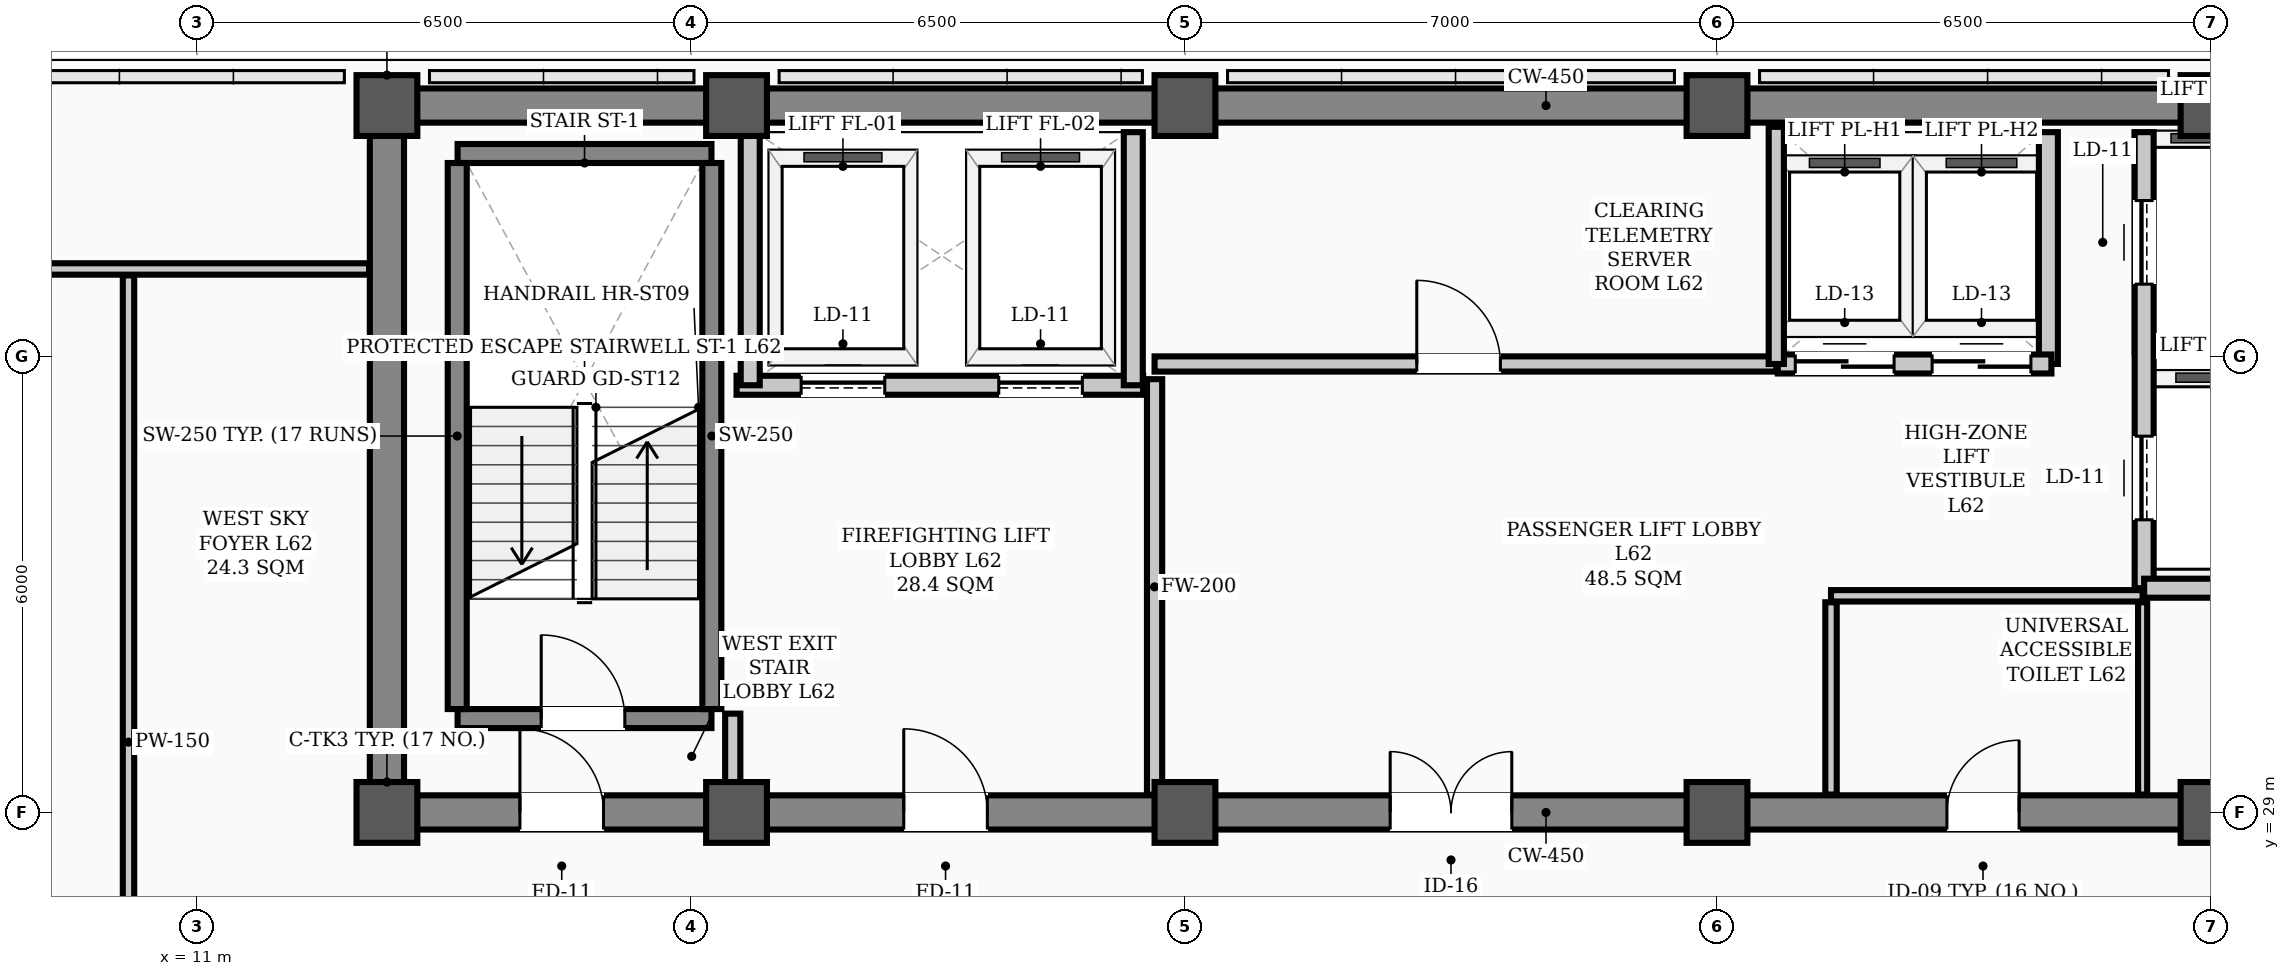
"""IFC4 building model, lengths in metres.
Left out: names, types, materials, properties, quantities, classifications, styles, units other than length and angle.
Written with IfcOpenShell. Run it as: python <this file> out.ifc"""

import sys

from ifc_helpers import new_model, si_unit, direction, frame, frame_2d, origin, origin_2d, place, context, subcontext, project, spatial, rectangle, hollow_rectangle, extrude, element, fill, save


model = new_model("IFC4")
c1 = context("Model", 3, precision=1e-05, world=origin(), true_north=direction((0.0, 1.0)))
c2 = subcontext(c1, "Body", "Model", "MODEL_VIEW")
j1 = project(units=[si_unit("LENGTHUNIT", "METRE"), si_unit("PLANEANGLEUNIT", "RADIAN")], contexts=[c1])
p1 = place(None, origin())
s1 = spatial("IfcSite", under=j1, at=p1, CompositionType="ELEMENT")
p2 = place(p1, origin())
s2 = spatial("IfcBuilding", under=s1, at=p2, CompositionType="ELEMENT")
p3 = place(p2, frame((0.0, 0.0, 250.1)))
s3 = spatial("IfcBuildingStorey", under=s2, at=p3, CompositionType="ELEMENT", Elevation=250.1)
for number, where, z_axis, x_axis in (
    (1, (13.5, 29.0, 0.0), (0.0, 0.0, 1.0), (1.0, 0.0, 0.0)),
    (2, (13.5, 38.3, 0.0), (0.0, 0.0, 1.0), (1.0, 0.0, 0.0)),
    (3, (18.1, 29.0, 0.0), (0.0, 0.0, 1.0), (1.0, 0.0, 0.0)),
    (4, (18.1, 38.3, 0.0), (0.0, 0.0, 1.0), (1.0, 0.0, 0.0)),
    (5, (24.0, 29.0, 0.0), (0.0, 0.0, 1.0), (1.0, 0.0, 0.0)),
    (6, (24.0, 38.3, 0.0), (0.0, 0.0, 1.0), (1.0, 0.0, 0.0)),
    (7, (31.0, 29.0, 0.0), (0.0, 0.0, 1.0), (1.0, 0.0, 0.0)),
    (8, (31.0, 38.3, 0.0), (0.0, 0.0, 1.0), (1.0, 0.0, 0.0)),
    (9, (37.5, 29.0, 0.0), (0.0, 0.0, 1.0), (1.0, 0.0, 0.0)),
    (10, (37.5, 38.3, 0.0), (0.0, 0.0, 1.0), (1.0, 0.0, 0.0)),
):
    element("IfcColumn", number, at=place(p3, frame(where, z_axis=z_axis, x_axis=x_axis)), inside=s3, PredefinedType="COLUMN", context=c2, shape_type="SweptSolid", body=[
        extrude(hollow_rectangle(XDim=0.8, YDim=0.8, WallThickness=0.032, InnerFilletRadius=0.016, OuterFilletRadius=0.048, at=origin_2d()), origin(), (0.0, 0.0, 1.0), 3.9),
    ])
p4 = place(p3, frame((13.5, 29.0, 0.0), z_axis=(0.0, 0.0, 1.0), x_axis=(1.0, 0.0, 0.0)))
e11 = element("IfcWall", 11, at=p4, inside=s3, PredefinedType="SHEAR", context=c2, shape_type="SweptSolid", body=[
    extrude(rectangle(XDim=30.5, YDim=0.45, at=frame_2d((15.25, 0.0))), origin(), (0.0, 0.0, 1.0), 3.72),
])
p5 = place(p4, frame((1.75, 0.0, 0.0)))
e12 = element("IfcOpeningElement", 12, at=p5, cuts=e11, PredefinedType="OPENING", context=c2, shape_type="SweptSolid", body=[
    extrude(rectangle(XDim=1.1, YDim=2.08, at=frame_2d((0.55, 1.04))), frame((0.0, 0.235, 0.0), z_axis=(0.0, -1.0, 0.0), x_axis=(1.0, 0.0, 0.0)), (0.0, 0.0, 1.0), 0.47),
])
p6 = place(p4, frame((26.7, 0.0, 0.0)))
e13 = element("IfcOpeningElement", 13, at=p6, cuts=e11, PredefinedType="OPENING", context=c2, shape_type="SweptSolid", body=[
    extrude(rectangle(XDim=1.1, YDim=2.08, at=frame_2d((0.55, 1.04))), frame((0.0, 0.235, 0.0), z_axis=(0.0, -1.0, 0.0), x_axis=(1.0, 0.0, 0.0)), (0.0, 0.0, 1.0), 0.47),
])
p7 = place(p4, frame((6.8, 0.0, 0.0)))
e14 = element("IfcOpeningElement", 14, at=p7, cuts=e11, PredefinedType="OPENING", context=c2, shape_type="SweptSolid", body=[
    extrude(rectangle(XDim=1.1, YDim=2.08, at=frame_2d((0.55, 1.04))), frame((0.0, 0.235, 0.0), z_axis=(0.0, -1.0, 0.0), x_axis=(1.0, 0.0, 0.0)), (0.0, 0.0, 1.0), 0.47),
])
p8 = place(p4, frame((13.2, 0.0, 0.0)))
e15 = element("IfcOpeningElement", 15, at=p8, cuts=e11, PredefinedType="OPENING", context=c2, shape_type="SweptSolid", body=[
    extrude(rectangle(XDim=1.6, YDim=2.08, at=frame_2d((0.8, 1.04))), frame((0.0, 0.235, 0.0), z_axis=(0.0, -1.0, 0.0), x_axis=(1.0, 0.0, 0.0)), (0.0, 0.0, 1.0), 0.47),
])
p9 = place(p4, frame((20.525, 0.0, 0.0)))
e16 = element("IfcOpeningElement", 16, at=p9, cuts=e11, PredefinedType="OPENING", context=c2, shape_type="SweptSolid", body=[
    extrude(rectangle(XDim=0.95, YDim=2.08, at=frame_2d((0.475, 1.04))), frame((0.0, 0.235, 0.0), z_axis=(0.0, -1.0, 0.0), x_axis=(1.0, 0.0, 0.0)), (0.0, 0.0, 1.0), 0.47),
])
p10 = place(p3, frame((13.5, 38.3, 0.0), z_axis=(0.0, 0.0, 1.0), x_axis=(1.0, 0.0, 0.0)))
e17 = element("IfcWall", 17, at=p10, inside=s3, PredefinedType="SHEAR", context=c2, shape_type="SweptSolid", body=[
    extrude(rectangle(XDim=30.5, YDim=0.45, at=frame_2d((15.25, 0.0))), origin(), (0.0, 0.0, 1.0), 3.72),
])
p11 = place(p3, frame((13.5, 29.35, 0.0), z_axis=(0.0, 0.0, 1.0), x_axis=(0.0, 1.0, 0.0)))
e18 = element("IfcWall", 18, at=p11, inside=s3, PredefinedType="SHEAR", context=c2, shape_type="SweptSolid", body=[
    extrude(rectangle(XDim=8.6, YDim=0.45, at=frame_2d((4.3, 0.0))), origin(), (0.0, 0.0, 1.0), 3.72),
])
p12 = place(p3, frame((14.43, 30.235, 0.0), z_axis=(0.0, 0.0, 1.0), x_axis=(1.0, 0.0, 0.0)))
e19 = element("IfcWall", 19, at=p12, inside=s3, PredefinedType="STANDARD", context=c2, shape_type="SweptSolid", body=[
    extrude(rectangle(XDim=3.34, YDim=0.25, at=frame_2d((1.67, 0.0))), origin(), (0.0, 0.0, 1.0), 3.72),
])
p13 = place(p12, frame((1.1, 0.0, 0.0)))
e20 = element("IfcOpeningElement", 20, at=p13, cuts=e19, PredefinedType="OPENING", context=c2, shape_type="SweptSolid", body=[
    extrude(rectangle(XDim=1.1, YDim=2.08, at=frame_2d((0.55, 1.04))), frame((0.0, 0.135, 0.0), z_axis=(0.0, -1.0, 0.0), x_axis=(1.0, 0.0, 0.0)), (0.0, 0.0, 1.0), 0.27),
])
p14 = place(p3, frame((14.43, 37.669, 0.0), z_axis=(0.0, 0.0, 1.0), x_axis=(1.0, 0.0, 0.0)))
e21 = element("IfcWall", 21, at=p14, inside=s3, PredefinedType="STANDARD", context=c2, shape_type="SweptSolid", body=[
    extrude(rectangle(XDim=3.34, YDim=0.25, at=frame_2d((1.67, 0.0))), origin(), (0.0, 0.0, 1.0), 3.72),
])
for number, where, z_axis, x_axis in (
    (22, (14.425, 30.36, 0.0), (0.0, 0.0, 1.0), (0.0, 1.0, 0.0)),
    (23, (17.775, 30.36, 0.0), (0.0, 0.0, 1.0), (0.0, 1.0, 0.0)),
):
    element("IfcWall", number, at=place(p3, frame(where, z_axis=z_axis, x_axis=x_axis)), inside=s3, PredefinedType="STANDARD", context=c2, shape_type="SweptSolid", body=[
        extrude(rectangle(XDim=7.184, YDim=0.25, at=frame_2d((3.592, 0.0))), origin(), (0.0, 0.0, 1.0), 3.72),
    ])
p15 = place(p3, frame((18.1, 34.62, 0.0), z_axis=(0.0, 0.0, 1.0), x_axis=(1.0, 0.0, 0.0)))
e24 = element("IfcWall", 24, at=p15, inside=s3, PredefinedType="STANDARD", context=c2, shape_type="SweptSolid", body=[
    extrude(rectangle(XDim=5.35, YDim=0.25, at=frame_2d((2.675, 0.0))), origin(), (0.0, 0.0, 1.0), 3.72),
])
p16 = place(p15, frame((0.85, 0.0, 0.0)))
e25 = element("IfcOpeningElement", 25, at=p16, cuts=e24, PredefinedType="OPENING", context=c2, shape_type="SweptSolid", body=[
    extrude(rectangle(XDim=1.1, YDim=2.08, at=frame_2d((0.55, 1.04))), frame((0.0, 0.135, 0.0), z_axis=(0.0, -1.0, 0.0), x_axis=(1.0, 0.0, 0.0)), (0.0, 0.0, 1.0), 0.27),
])
p17 = place(p15, frame((3.45, 0.0, 0.0)))
e26 = element("IfcOpeningElement", 26, at=p17, cuts=e24, PredefinedType="OPENING", context=c2, shape_type="SweptSolid", body=[
    extrude(rectangle(XDim=1.1, YDim=2.08, at=frame_2d((0.55, 1.04))), frame((0.0, 0.135, 0.0), z_axis=(0.0, -1.0, 0.0), x_axis=(1.0, 0.0, 0.0)), (0.0, 0.0, 1.0), 0.27),
])
p18 = place(p3, frame((36.62, 31.95, 0.0), z_axis=(0.0, 0.0, 1.0), x_axis=(0.0, 1.0, 0.0)))
e27 = element("IfcWall", 27, at=p18, inside=s3, PredefinedType="STANDARD", context=c2, shape_type="SweptSolid", body=[
    extrude(rectangle(XDim=6.0, YDim=0.25, at=frame_2d((3.0, 0.0))), origin(), (0.0, 0.0, 1.0), 3.72),
])
p19 = place(p18, frame((0.9, 0.0, 0.0)))
e28 = element("IfcOpeningElement", 28, at=p19, cuts=e27, PredefinedType="OPENING", context=c2, shape_type="SweptSolid", body=[
    extrude(rectangle(XDim=1.1, YDim=2.08, at=frame_2d((0.55, 1.04))), frame((0.0, 0.135, 0.0), z_axis=(0.0, -1.0, 0.0), x_axis=(1.0, 0.0, 0.0)), (0.0, 0.0, 1.0), 0.27),
])
p20 = place(p18, frame((4.0, 0.0, 0.0)))
e29 = element("IfcOpeningElement", 29, at=p20, cuts=e27, PredefinedType="OPENING", context=c2, shape_type="SweptSolid", body=[
    extrude(rectangle(XDim=1.1, YDim=2.08, at=frame_2d((0.55, 1.04))), frame((0.0, 0.135, 0.0), z_axis=(0.0, -1.0, 0.0), x_axis=(1.0, 0.0, 0.0)), (0.0, 0.0, 1.0), 0.27),
])
p21 = place(p3, frame((36.62, 31.95, 0.0), z_axis=(0.0, 0.0, 1.0), x_axis=(1.0, 0.0, 0.0)))
e30 = element("IfcWall", 30, at=p21, inside=s3, PredefinedType="STANDARD", context=c2, shape_type="SweptSolid", body=[
    extrude(rectangle(XDim=1.9, YDim=0.25, at=frame_2d((0.95, 0.0))), origin(), (0.0, 0.0, 1.0), 3.48),
])
for number, where, z_axis, x_axis in (
    (31, (18.28, 34.62, 0.0), (0.0, 0.0, 1.0), (0.0, 1.0, 0.0)),
    (32, (23.32, 34.62, 0.0), (0.0, 0.0, 1.0), (0.0, 1.0, 0.0)),
):
    element("IfcWall", number, at=place(p3, frame(where, z_axis=z_axis, x_axis=x_axis)), inside=s3, PredefinedType="STANDARD", context=c2, shape_type="SweptSolid", body=[
        extrude(rectangle(XDim=3.33, YDim=0.25, at=frame_2d((1.665, 0.0))), origin(), (0.0, 0.0, 1.0), 3.72),
    ])
p22 = place(p3, frame((35.36, 34.9, 0.0), z_axis=(0.0, 0.0, 1.0), x_axis=(0.0, 1.0, 0.0)))
e33 = element("IfcWall", 33, at=p22, inside=s3, PredefinedType="STANDARD", context=c2, shape_type="SweptSolid", body=[
    extrude(rectangle(XDim=3.05, YDim=0.25, at=frame_2d((1.525, 0.0))), origin(), (0.0, 0.0, 1.0), 3.72),
])
p23 = place(p3, frame((31.8, 34.9, 0.0), z_axis=(0.0, 0.0, 1.0), x_axis=(1.0, 0.0, 0.0)))
e34 = element("IfcWall", 34, at=p23, inside=s3, PredefinedType="STANDARD", context=c2, shape_type="SweptSolid", body=[
    extrude(rectangle(XDim=3.6, YDim=0.25, at=frame_2d((1.8, 0.0))), origin(), (0.0, 0.0, 1.0), 3.72),
])
p24 = place(p23, frame((0.23, 0.0, 0.0)))
e35 = element("IfcOpeningElement", 35, at=p24, cuts=e34, PredefinedType="OPENING", context=c2, shape_type="SweptSolid", body=[
    extrude(rectangle(XDim=1.3, YDim=2.08, at=frame_2d((0.65, 1.04))), frame((0.0, 0.135, 0.0), z_axis=(0.0, -1.0, 0.0), x_axis=(1.0, 0.0, 0.0)), (0.0, 0.0, 1.0), 0.27),
])
p25 = place(p23, frame((2.03, 0.0, 0.0)))
e36 = element("IfcOpeningElement", 36, at=p25, cuts=e34, PredefinedType="OPENING", context=c2, shape_type="SweptSolid", body=[
    extrude(rectangle(XDim=1.3, YDim=2.08, at=frame_2d((0.65, 1.04))), frame((0.0, 0.135, 0.0), z_axis=(0.0, -1.0, 0.0), x_axis=(1.0, 0.0, 0.0)), (0.0, 0.0, 1.0), 0.27),
])
p26 = place(p3, frame((23.6, 34.9, 0.0), z_axis=(0.0, 0.0, 1.0), x_axis=(1.0, 0.0, 0.0)))
e37 = element("IfcWall", 37, at=p26, inside=s3, PredefinedType="STANDARD", context=c2, shape_type="SweptSolid", body=[
    extrude(rectangle(XDim=8.18, YDim=0.2, at=frame_2d((4.09, 0.0))), origin(), (0.0, 0.0, 1.0), 3.72),
])
p27 = place(p26, frame((3.45, 0.0, 0.0)))
e38 = element("IfcOpeningElement", 38, at=p27, cuts=e37, PredefinedType="OPENING", context=c2, shape_type="SweptSolid", body=[
    extrude(rectangle(XDim=1.1, YDim=2.08, at=frame_2d((0.55, 1.04))), frame((0.0, 0.11, 0.0), z_axis=(0.0, -1.0, 0.0), x_axis=(1.0, 0.0, 0.0)), (0.0, 0.0, 1.0), 0.22),
])
p28 = place(p3, frame((32.5, 31.85, 0.0), z_axis=(0.0, 0.0, 1.0), x_axis=(1.0, 0.0, 0.0)))
e39 = element("IfcWall", 39, at=p28, inside=s3, PredefinedType="PARTITIONING", context=c2, shape_type="SweptSolid", body=[
    extrude(rectangle(XDim=4.1, YDim=0.15, at=frame_2d((2.05, 0.0))), origin(), (0.0, 0.0, 1.0), 3.72),
])
p29 = place(p3, frame((4.81, 36.15, 0.0), z_axis=(0.0, 0.0, 1.0), x_axis=(1.0, 0.0, 0.0)))
e40 = element("IfcWall", 40, at=p29, inside=s3, PredefinedType="PARTITIONING", context=c2, shape_type="SweptSolid", body=[
    extrude(rectangle(XDim=8.455, YDim=0.15, at=frame_2d((4.228, 0.0))), origin(), (0.0, 0.0, 1.0), 3.2),
])
p30 = place(p3, frame((18.05, 29.235, 0.0), z_axis=(0.0, 0.0, 1.0), x_axis=(0.0, 1.0, 0.0)))
e41 = element("IfcWall", 41, at=p30, inside=s3, PredefinedType="STANDARD", context=c2, shape_type="SweptSolid", body=[
    extrude(rectangle(XDim=1.065, YDim=0.2, at=frame_2d((0.532, 0.0))), origin(), (0.0, 0.0, 1.0), 3.35),
])
p31 = place(p3, frame((23.6, 29.235, 0.0), z_axis=(0.0, 0.0, 1.0), x_axis=(0.0, 1.0, 0.0)))
e42 = element("IfcWall", 42, at=p31, inside=s3, PredefinedType="STANDARD", context=c2, shape_type="SweptSolid", body=[
    extrude(rectangle(XDim=5.465, YDim=0.2, at=frame_2d((2.732, 0.0))), origin(), (0.0, 0.0, 1.0), 3.2),
])
p32 = place(p3, frame((32.5, 29.235, 0.0), z_axis=(0.0, 0.0, 1.0), x_axis=(0.0, 1.0, 0.0)))
e43 = element("IfcWall", 43, at=p32, inside=s3, PredefinedType="PARTITIONING", context=c2, shape_type="SweptSolid", body=[
    extrude(rectangle(XDim=2.53, YDim=0.15, at=frame_2d((1.265, 0.0))), origin(), (0.0, 0.0, 1.0), 3.35),
])
p33 = place(p3, frame((36.6, 29.235, 0.0), z_axis=(0.0, 0.0, 1.0), x_axis=(0.0, 1.0, 0.0)))
e44 = element("IfcWall", 44, at=p33, inside=s3, PredefinedType="PARTITIONING", context=c2, shape_type="SweptSolid", body=[
    extrude(rectangle(XDim=2.53, YDim=0.12, at=frame_2d((1.265, 0.0))), origin(), (0.0, 0.0, 1.0), 3.35),
])
p34 = place(p3, frame((10.1, 23.785, 0.0), z_axis=(0.0, 0.0, 1.0), x_axis=(0.0, 1.0, 0.0)))
e45 = element("IfcWall", 45, at=p34, inside=s3, PredefinedType="PARTITIONING", context=c2, shape_type="SweptSolid", body=[
    extrude(rectangle(XDim=12.28, YDim=0.15, at=frame_2d((6.14, 0.0))), origin(), (0.0, 0.0, 1.0), 3.1),
])
p35 = place(p34, frame((0.64, 0.0, 0.0)))
e46 = element("IfcOpeningElement", 46, at=p35, cuts=e45, PredefinedType="OPENING", context=c2, shape_type="SweptSolid", body=[
    extrude(rectangle(XDim=0.95, YDim=2.08, at=frame_2d((0.475, 1.04))), frame((0.0, 0.085, 0.0), z_axis=(0.0, -1.0, 0.0), x_axis=(1.0, 0.0, 0.0)), (0.0, 0.0, 1.0), 0.17),
])
p36 = place(p3, frame((31.78, 34.9, 0.0), z_axis=(0.0, 0.0, 1.0), x_axis=(0.0, 1.0, 0.0)))
e47 = element("IfcWall", 47, at=p36, inside=s3, PredefinedType="STANDARD", context=c2, shape_type="SweptSolid", body=[
    extrude(rectangle(XDim=3.12, YDim=0.2, at=frame_2d((1.56, 0.0))), origin(), (0.0, 0.0, 1.0), 3.72),
])
p37 = place(p13, origin())
e48 = element("IfcDoor", 48, at=p37, inside=s3, OperationType="SINGLE_SWING_LEFT", PredefinedType="DOOR", context=c2, shape_type="SweptSolid", body=[
    extrude(rectangle(XDim=1.1, YDim=2.08, at=frame_2d((0.55, 1.04))), frame((0.0, 0.025, 0.0), z_axis=(0.0, -1.0, 0.0), x_axis=(1.0, 0.0, 0.0)), (0.0, 0.0, 1.0), 0.05),
])
fill(e20, e48)
p38 = place(p5, origin())
e49 = element("IfcDoor", 49, at=p38, inside=s3, OperationType="SINGLE_SWING_LEFT", PredefinedType="DOOR", context=c2, shape_type="SweptSolid", body=[
    extrude(rectangle(XDim=1.1, YDim=2.08, at=frame_2d((0.55, 1.04))), frame((0.0, 0.025, 0.0), z_axis=(0.0, -1.0, 0.0), x_axis=(1.0, 0.0, 0.0)), (0.0, 0.0, 1.0), 0.05),
])
fill(e12, e49)
p39 = place(p7, origin())
e50 = element("IfcDoor", 50, at=p39, inside=s3, OperationType="SINGLE_SWING_LEFT", PredefinedType="DOOR", context=c2, shape_type="SweptSolid", body=[
    extrude(rectangle(XDim=1.1, YDim=2.08, at=frame_2d((0.55, 1.04))), frame((0.0, 0.025, 0.0), z_axis=(0.0, -1.0, 0.0), x_axis=(1.0, 0.0, 0.0)), (0.0, 0.0, 1.0), 0.05),
])
fill(e14, e50)
p40 = place(p8, origin())
e51 = element("IfcDoor", 51, at=p40, inside=s3, OperationType="DOUBLE_DOOR_SINGLE_SWING", PredefinedType="DOOR", context=c2, shape_type="SweptSolid", body=[
    extrude(rectangle(XDim=1.6, YDim=2.08, at=frame_2d((0.8, 1.04))), frame((0.0, 0.025, 0.0), z_axis=(0.0, -1.0, 0.0), x_axis=(1.0, 0.0, 0.0)), (0.0, 0.0, 1.0), 0.05),
])
fill(e15, e51)
p41 = place(p27, origin())
e52 = element("IfcDoor", 52, at=p41, inside=s3, OperationType="SINGLE_SWING_LEFT", PredefinedType="DOOR", context=c2, shape_type="SweptSolid", body=[
    extrude(rectangle(XDim=1.1, YDim=2.08, at=frame_2d((0.55, 1.04))), frame((0.0, 0.025, 0.0), z_axis=(0.0, -1.0, 0.0), x_axis=(1.0, 0.0, 0.0)), (0.0, 0.0, 1.0), 0.05),
])
fill(e38, e52)
p42 = place(p9, origin())
e53 = element("IfcDoor", 53, at=p42, inside=s3, OperationType="SINGLE_SWING_RIGHT", PredefinedType="DOOR", context=c2, shape_type="SweptSolid", body=[
    extrude(rectangle(XDim=0.95, YDim=2.08, at=frame_2d((0.475, 1.04))), frame((0.0, 0.025, 0.0), z_axis=(0.0, -1.0, 0.0), x_axis=(1.0, 0.0, 0.0)), (0.0, 0.0, 1.0), 0.05),
])
fill(e16, e53)
p43 = place(p16, origin())
e54 = element("IfcDoor", 54, at=p43, inside=s3, OperationType="SLIDING_TO_LEFT", PredefinedType="DOOR", context=c2, shape_type="SweptSolid", body=[
    extrude(rectangle(XDim=1.1, YDim=2.08, at=frame_2d((0.55, 1.04))), frame((0.0, 0.025, 0.0), z_axis=(0.0, -1.0, 0.0), x_axis=(1.0, 0.0, 0.0)), (0.0, 0.0, 1.0), 0.05),
])
fill(e25, e54)
p44 = place(p17, origin())
e55 = element("IfcDoor", 55, at=p44, inside=s3, OperationType="SLIDING_TO_LEFT", PredefinedType="DOOR", context=c2, shape_type="SweptSolid", body=[
    extrude(rectangle(XDim=1.1, YDim=2.08, at=frame_2d((0.55, 1.04))), frame((0.0, 0.025, 0.0), z_axis=(0.0, -1.0, 0.0), x_axis=(1.0, 0.0, 0.0)), (0.0, 0.0, 1.0), 0.05),
])
fill(e26, e55)
p45 = place(p19, origin())
e56 = element("IfcDoor", 56, at=p45, inside=s3, OperationType="SLIDING_TO_LEFT", PredefinedType="DOOR", context=c2, shape_type="SweptSolid", body=[
    extrude(rectangle(XDim=1.1, YDim=2.08, at=frame_2d((0.55, 1.04))), frame((0.0, 0.025, 0.0), z_axis=(0.0, -1.0, 0.0), x_axis=(1.0, 0.0, 0.0)), (0.0, 0.0, 1.0), 0.05),
])
fill(e28, e56)
p46 = place(p20, origin())
e57 = element("IfcDoor", 57, at=p46, inside=s3, OperationType="SLIDING_TO_LEFT", PredefinedType="DOOR", context=c2, shape_type="SweptSolid", body=[
    extrude(rectangle(XDim=1.1, YDim=2.08, at=frame_2d((0.55, 1.04))), frame((0.0, 0.025, 0.0), z_axis=(0.0, -1.0, 0.0), x_axis=(1.0, 0.0, 0.0)), (0.0, 0.0, 1.0), 0.05),
])
fill(e29, e57)
p47 = place(p24, origin())
e58 = element("IfcDoor", 58, at=p47, inside=s3, OperationType="DOUBLE_DOOR_SLIDING", PredefinedType="DOOR", context=c2, shape_type="SweptSolid", body=[
    extrude(rectangle(XDim=1.3, YDim=2.08, at=frame_2d((0.65, 1.04))), frame((0.0, 0.025, 0.0), z_axis=(0.0, -1.0, 0.0), x_axis=(1.0, 0.0, 0.0)), (0.0, 0.0, 1.0), 0.05),
])
fill(e35, e58)
p48 = place(p25, origin())
e59 = element("IfcDoor", 59, at=p48, inside=s3, OperationType="DOUBLE_DOOR_SLIDING", PredefinedType="DOOR", context=c2, shape_type="SweptSolid", body=[
    extrude(rectangle(XDim=1.3, YDim=2.08, at=frame_2d((0.65, 1.04))), frame((0.0, 0.025, 0.0), z_axis=(0.0, -1.0, 0.0), x_axis=(1.0, 0.0, 0.0)), (0.0, 0.0, 1.0), 0.05),
])
fill(e36, e59)
save(model, sys.argv[1])
